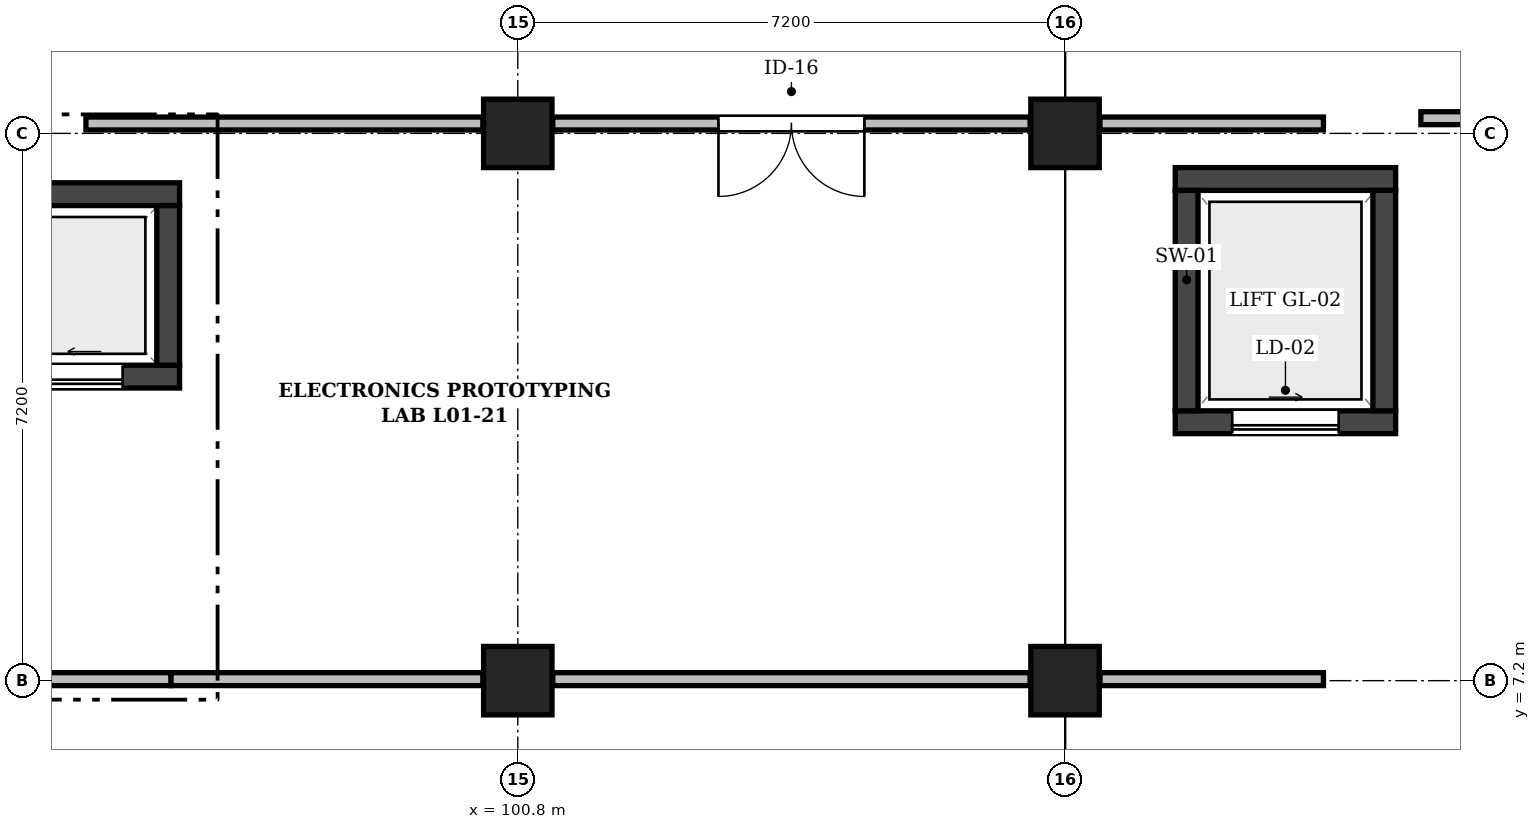
"""IFC4 building model, lengths in metres.
Left out: names, types, materials, properties, quantities, classifications, styles, units other than length and angle.
Written with IfcOpenShell. Run it as: python <this file> out.ifc"""

import sys

from ifc_helpers import new_model, si_unit, direction, frame, frame_2d, origin, origin_2d, place, context, subcontext, project, spatial, rectangle, extrude, element, fill, save


model = new_model("IFC4")
c1 = context("Model", 3, precision=1e-05, world=origin(), true_north=direction((0.0, 1.0)))
c2 = subcontext(c1, "Body", "Model", "MODEL_VIEW")
j1 = project(units=[si_unit("LENGTHUNIT", "METRE"), si_unit("PLANEANGLEUNIT", "RADIAN")], contexts=[c1])
p1 = place(None, origin())
s1 = spatial("IfcSite", under=j1, at=p1, CompositionType="ELEMENT")
p2 = place(p1, origin())
s2 = spatial("IfcBuilding", under=s1, at=p2, CompositionType="ELEMENT")
p3 = place(p2, frame((0.0, 0.0, 4.8)))
s3 = spatial("IfcBuildingStorey", under=s2, at=p3, CompositionType="ELEMENT", Elevation=4.8)
for number, where, z_axis, x_axis in (
    (1, (100.8, 7.2, 0.0), (0.0, 0.0, 1.0), (1.0, 0.0, 0.0)),
    (2, (100.8, 14.4, 0.0), (0.0, 0.0, 1.0), (1.0, 0.0, 0.0)),
    (3, (108.0, 7.2, 0.0), (0.0, 0.0, 1.0), (1.0, 0.0, 0.0)),
    (4, (108.0, 14.4, 0.0), (0.0, 0.0, 1.0), (1.0, 0.0, 0.0)),
):
    element("IfcColumn", number, at=place(p3, frame(where, z_axis=z_axis, x_axis=x_axis)), inside=s3, PredefinedType="COLUMN", context=c2, shape_type="SweptSolid", body=[
        extrude(rectangle(XDim=0.9, YDim=0.9, at=origin_2d()), origin(), (0.0, 0.0, 1.0), 4.8),
    ])
p4 = place(p3, frame((93.85, 11.2, 0.0), z_axis=(0.0, 0.0, 1.0), x_axis=(1.0, 0.0, 0.0)))
e5 = element("IfcWall", 5, at=p4, inside=s3, PredefinedType="SHEAR", context=c2, shape_type="SweptSolid", body=[
    extrude(rectangle(XDim=2.5, YDim=0.3, at=frame_2d((1.25, 0.0))), origin(), (0.0, 0.0, 1.0), 4.55),
])
p5 = place(p4, frame((0.75, 0.0, 0.0)))
e6 = element("IfcOpeningElement", 6, at=p5, cuts=e5, PredefinedType="OPENING", context=c2, shape_type="SweptSolid", body=[
    extrude(rectangle(XDim=1.0, YDim=2.1, at=frame_2d((0.5, 1.05))), frame((0.0, 0.162, 0.0), z_axis=(0.0, -1.0, 0.0), x_axis=(1.0, 0.0, 0.0)), (0.0, 0.0, 1.0), 0.324),
])
p6 = place(p3, frame((93.85, 13.6, 0.0), z_axis=(0.0, 0.0, 1.0), x_axis=(1.0, 0.0, 0.0)))
e7 = element("IfcWall", 7, at=p6, inside=s3, PredefinedType="SHEAR", context=c2, shape_type="SweptSolid", body=[
    extrude(rectangle(XDim=2.5, YDim=0.3, at=frame_2d((1.25, 0.0))), origin(), (0.0, 0.0, 1.0), 4.55),
])
p7 = place(p3, frame((96.2, 11.35, 0.0), z_axis=(0.0, 0.0, 1.0), x_axis=(0.0, 1.0, 0.0)))
e8 = element("IfcWall", 8, at=p7, inside=s3, PredefinedType="SHEAR", context=c2, shape_type="SweptSolid", body=[
    extrude(rectangle(XDim=2.1, YDim=0.3, at=frame_2d((1.05, 0.0))), origin(), (0.0, 0.0, 1.0), 4.55),
])
p8 = place(p3, frame((109.45, 10.6, 0.0), z_axis=(0.0, 0.0, 1.0), x_axis=(1.0, 0.0, 0.0)))
e9 = element("IfcWall", 9, at=p8, inside=s3, PredefinedType="SHEAR", context=c2, shape_type="SweptSolid", body=[
    extrude(rectangle(XDim=2.9, YDim=0.3, at=frame_2d((1.45, 0.0))), origin(), (0.0, 0.0, 1.0), 4.55),
])
p9 = place(p8, frame((0.75, 0.0, 0.0)))
e10 = element("IfcOpeningElement", 10, at=p9, cuts=e9, PredefinedType="OPENING", context=c2, shape_type="SweptSolid", body=[
    extrude(rectangle(XDim=1.4, YDim=2.2, at=frame_2d((0.7, 1.1))), frame((0.0, 0.162, 0.0), z_axis=(0.0, -1.0, 0.0), x_axis=(1.0, 0.0, 0.0)), (0.0, 0.0, 1.0), 0.324),
])
p10 = place(p3, frame((109.45, 13.8, 0.0), z_axis=(0.0, 0.0, 1.0), x_axis=(1.0, 0.0, 0.0)))
e11 = element("IfcWall", 11, at=p10, inside=s3, PredefinedType="SHEAR", context=c2, shape_type="SweptSolid", body=[
    extrude(rectangle(XDim=2.9, YDim=0.3, at=frame_2d((1.45, 0.0))), origin(), (0.0, 0.0, 1.0), 4.55),
])
for number, where, z_axis, x_axis in (
    (12, (109.6, 10.75, 0.0), (0.0, 0.0, 1.0), (0.0, 1.0, 0.0)),
    (13, (112.2, 10.75, 0.0), (0.0, 0.0, 1.0), (0.0, 1.0, 0.0)),
):
    element("IfcWall", number, at=place(p3, frame(where, z_axis=z_axis, x_axis=x_axis)), inside=s3, PredefinedType="SHEAR", context=c2, shape_type="SweptSolid", body=[
        extrude(rectangle(XDim=2.9, YDim=0.3, at=frame_2d((1.45, 0.0))), origin(), (0.0, 0.0, 1.0), 4.55),
    ])
p11 = place(p3, frame((101.26, 14.53, 0.0), z_axis=(0.0, 0.0, 1.0), x_axis=(1.0, 0.0, 0.0)))
e14 = element("IfcWall", 14, at=p11, inside=s3, PredefinedType="PARTITIONING", context=c2, shape_type="SweptSolid", body=[
    extrude(rectangle(XDim=6.28, YDim=0.17, at=frame_2d((3.14, 0.0))), origin(), (0.0, 0.0, 1.0), 3.9),
])
p12 = place(p11, frame((2.18, 0.0, 0.0)))
e15 = element("IfcOpeningElement", 15, at=p12, cuts=e14, PredefinedType="OPENING", context=c2, shape_type="SweptSolid", body=[
    extrude(rectangle(XDim=1.92, YDim=2.32, at=frame_2d((0.96, 1.16))), frame((0.0, 0.097, 0.0), z_axis=(0.0, -1.0, 0.0), x_axis=(1.0, 0.0, 0.0)), (0.0, 0.0, 1.0), 0.194),
])
p13 = place(p3, frame((95.118, 14.53, 0.0), z_axis=(0.0, 0.0, 1.0), x_axis=(1.0, 0.0, 0.0)))
e16 = element("IfcWall", 16, at=p13, inside=s3, PredefinedType="PARTITIONING", context=c2, shape_type="SweptSolid", body=[
    extrude(rectangle(XDim=5.222, YDim=0.17, at=frame_2d((2.611, 0.0))), origin(), (0.0, 0.0, 1.0), 3.9),
])
p14 = place(p3, frame((108.46, 14.53, 0.0), z_axis=(0.0, 0.0, 1.0), x_axis=(1.0, 0.0, 0.0)))
e17 = element("IfcWall", 17, at=p14, inside=s3, PredefinedType="PARTITIONING", context=c2, shape_type="SweptSolid", body=[
    extrude(rectangle(XDim=2.94, YDim=0.17, at=frame_2d((1.47, 0.0))), origin(), (0.0, 0.0, 1.0), 3.9),
])
p15 = place(p3, frame((112.682, 14.6, 0.0), z_axis=(0.0, 0.0, 1.0), x_axis=(1.0, 0.0, 0.0)))
e18 = element("IfcWall", 18, at=p15, inside=s3, PredefinedType="PARTITIONING", context=c2, shape_type="SweptSolid", body=[
    extrude(rectangle(XDim=2.083, YDim=0.17, at=frame_2d((1.042, 0.0))), origin(), (0.0, 0.0, 1.0), 3.9),
])
p16 = place(p3, frame((94.06, 7.22, 0.0), z_axis=(0.0, 0.0, 1.0), x_axis=(1.0, 0.0, 0.0)))
e19 = element("IfcWall", 19, at=p16, inside=s3, PredefinedType="PARTITIONING", context=c2, shape_type="SweptSolid", body=[
    extrude(rectangle(XDim=2.178, YDim=0.17, at=frame_2d((1.089, 0.0))), origin(), (0.0, 0.0, 1.0), 3.9),
])
p17 = place(p3, frame((101.26, 7.22, 0.0), z_axis=(0.0, 0.0, 1.0), x_axis=(1.0, 0.0, 0.0)))
e20 = element("IfcWall", 20, at=p17, inside=s3, PredefinedType="PARTITIONING", context=c2, shape_type="SweptSolid", body=[
    extrude(rectangle(XDim=6.28, YDim=0.17, at=frame_2d((3.14, 0.0))), origin(), (0.0, 0.0, 1.0), 3.9),
])
p18 = place(p3, frame((96.238, 7.22, 0.0), z_axis=(0.0, 0.0, 1.0), x_axis=(1.0, 0.0, 0.0)))
e21 = element("IfcWall", 21, at=p18, inside=s3, PredefinedType="PARTITIONING", context=c2, shape_type="SweptSolid", body=[
    extrude(rectangle(XDim=4.102, YDim=0.17, at=frame_2d((2.051, 0.0))), origin(), (0.0, 0.0, 1.0), 3.9),
])
p19 = place(p3, frame((108.46, 7.22, 0.0), z_axis=(0.0, 0.0, 1.0), x_axis=(1.0, 0.0, 0.0)))
e22 = element("IfcWall", 22, at=p19, inside=s3, PredefinedType="PARTITIONING", context=c2, shape_type="SweptSolid", body=[
    extrude(rectangle(XDim=2.94, YDim=0.17, at=frame_2d((1.47, 0.0))), origin(), (0.0, 0.0, 1.0), 3.9),
])
p20 = place(p5, frame((1.0, 0.0, 0.0), z_axis=(0.0, 0.0, 1.0), x_axis=(-1.0, 0.0, 0.0)))
e23 = element("IfcDoor", 23, at=p20, inside=s3, OperationType="SLIDING_TO_LEFT", PredefinedType="DOOR", context=c2, shape_type="SweptSolid", body=[
    extrude(rectangle(XDim=1.0, YDim=2.1, at=frame_2d((0.5, 1.05))), frame((0.0, 0.025, 0.0), z_axis=(0.0, -1.0, 0.0), x_axis=(1.0, 0.0, 0.0)), (0.0, 0.0, 1.0), 0.05),
])
fill(e6, e23)
p21 = place(p9, frame((1.4, 0.0, 0.0), z_axis=(0.0, 0.0, 1.0), x_axis=(-1.0, 0.0, 0.0)))
e24 = element("IfcDoor", 24, at=p21, inside=s3, OperationType="SLIDING_TO_RIGHT", PredefinedType="DOOR", context=c2, shape_type="SweptSolid", body=[
    extrude(rectangle(XDim=1.4, YDim=2.2, at=frame_2d((0.7, 1.1))), frame((0.0, 0.025, 0.0), z_axis=(0.0, -1.0, 0.0), x_axis=(1.0, 0.0, 0.0)), (0.0, 0.0, 1.0), 0.05),
])
fill(e10, e24)
p22 = place(p12, frame((1.92, 0.0, 0.0), z_axis=(0.0, 0.0, 1.0), x_axis=(-1.0, 0.0, 0.0)))
e25 = element("IfcDoor", 25, at=p22, inside=s3, OperationType="DOUBLE_DOOR_SINGLE_SWING", PredefinedType="DOOR", context=c2, shape_type="SweptSolid", body=[
    extrude(rectangle(XDim=1.92, YDim=2.32, at=frame_2d((0.96, 1.16))), frame((0.0, 0.025, 0.0), z_axis=(0.0, -1.0, 0.0), x_axis=(1.0, 0.0, 0.0)), (0.0, 0.0, 1.0), 0.05),
])
fill(e15, e25)
save(model, sys.argv[1])
